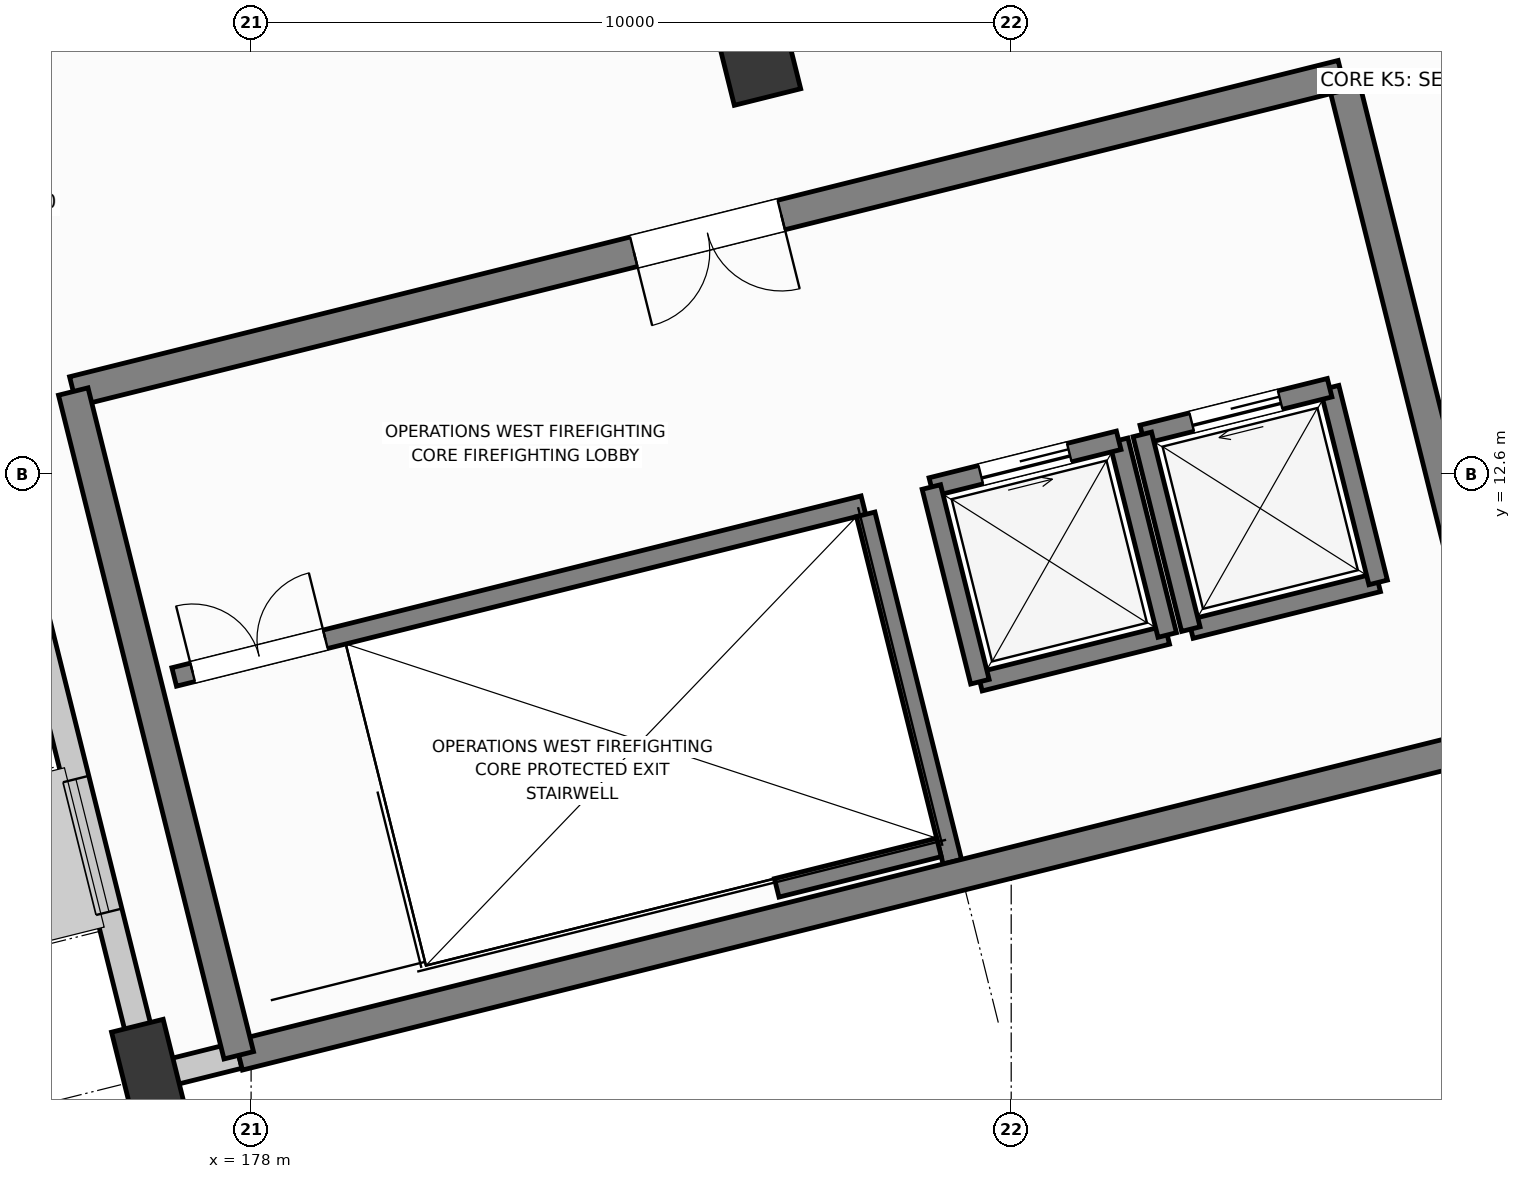
"""IFC4 building model, lengths in metres.
Left out: names, types, materials, properties, quantities, classifications, styles, units other than length and angle.
Written with IfcOpenShell. Run it as: python <this file> out.ifc"""

import sys

from ifc_helpers import new_model, si_unit, direction, frame, frame_2d, origin, origin_2d, place, context, subcontext, project, spatial, rectangle, extrude, element, fill, save


model = new_model("IFC4")
c1 = context("Model", 3, precision=1e-05, world=origin(), true_north=direction((0.0, 1.0)))
c2 = subcontext(c1, "Body", "Model", "MODEL_VIEW")
j1 = project(units=[si_unit("LENGTHUNIT", "METRE"), si_unit("PLANEANGLEUNIT", "RADIAN")], contexts=[c1])
p1 = place(None, origin())
s1 = spatial("IfcSite", under=j1, at=p1, CompositionType="ELEMENT")
p2 = place(p1, origin())
s2 = spatial("IfcBuilding", under=s1, at=p2, CompositionType="ELEMENT")
p3 = place(p2, frame((0.0, 0.0, 24.6)))
s3 = spatial("IfcBuildingStorey", under=s2, at=p3, CompositionType="ELEMENT", Elevation=24.6)
p4 = place(p3, frame((176.673, 4.661, 0.0), z_axis=(0.0, 0.0, 1.0), x_axis=(0.970295726276, 0.2419218956, 0.0)))
e1 = element("IfcColumn", 1, at=p4, inside=s3, PredefinedType="COLUMN", context=c2, shape_type="SweptSolid", body=[
    extrude(rectangle(XDim=0.7, YDim=1.4, at=origin_2d()), origin(), (0.0, 0.0, 1.0), 4.2),
])
p5 = place(p3, frame((184.685, 17.995, 0.0), z_axis=(0.0, 0.0, 1.0), x_axis=(0.970295726276, 0.2419218956, 0.0)))
e2 = element("IfcColumn", 2, at=p5, inside=s3, PredefinedType="COLUMN", context=c2, shape_type="SweptSolid", body=[
    extrude(rectangle(XDim=0.9, YDim=0.9, at=origin_2d()), origin(), (0.0, 0.0, 1.0), 4.2),
])
p6 = place(p3, frame((174.113, 14.931, 0.0), z_axis=(0.0, 0.0, 1.0), x_axis=(0.241921235018, -0.970295890977, 0.0)))
e3 = element("IfcWall", 3, at=p6, inside=s3, PredefinedType="STANDARD", context=c2, shape_type="SweptSolid", body=[
    extrude(rectangle(XDim=9.92, YDim=0.35, at=frame_2d((4.96, 0.0))), origin(), (0.0, 0.0, 1.0), 3.575),
])
p7 = place(p6, frame((1.58, 0.0, 0.85)))
e4 = element("IfcOpeningElement", 4, at=p7, cuts=e3, PredefinedType="OPENING", context=c2, shape_type="SweptSolid", body=[
    extrude(rectangle(XDim=1.8, YDim=1.65, at=frame_2d((0.9, 0.825))), frame((0.0, 0.185, 0.0), z_axis=(0.0, -1.0, 0.0), x_axis=(1.0, 0.0, 0.0)), (0.0, 0.0, 1.0), 0.37),
])
p8 = place(p6, frame((6.54, 0.0, 0.85)))
e5 = element("IfcOpeningElement", 5, at=p8, cuts=e3, PredefinedType="OPENING", context=c2, shape_type="SweptSolid", body=[
    extrude(rectangle(XDim=1.8, YDim=1.65, at=frame_2d((0.9, 0.825))), frame((0.0, 0.185, 0.0), z_axis=(0.0, -1.0, 0.0), x_axis=(1.0, 0.0, 0.0)), (0.0, 0.0, 1.0), 0.37),
])
p9 = place(p3, frame((176.673, 4.661, 0.0), z_axis=(0.0, 0.0, 1.0), x_axis=(0.970294277425, 0.24192770655, 0.0)))
e6 = element("IfcWall", 6, at=p9, inside=s3, PredefinedType="STANDARD", context=c2, shape_type="SweptSolid", body=[
    extrude(rectangle(XDim=1.2, YDim=0.35, at=frame_2d((0.6, 0.0))), origin(), (0.0, 0.0, 1.0), 4.2),
])
p10 = place(p3, frame((187.588, 9.866, 0.0), z_axis=(0.0, 0.0, 1.0), x_axis=(0.97029284861, 0.241933436994, 0.0)))
e7 = element("IfcWall", 7, at=p10, inside=s3, PredefinedType="SOLIDWALL", context=c2, shape_type="SweptSolid", body=[
    extrude(rectangle(XDim=2.54, YDim=0.25, at=frame_2d((1.27, 0.0))), origin(), (0.0, 0.0, 1.0), 3.98),
])
p11 = place(p3, frame((190.053, 10.481, 0.0), z_axis=(0.0, 0.0, 1.0), x_axis=(-0.241938414856, 0.970291607413, 0.0)))
e8 = element("IfcWall", 8, at=p11, inside=s3, PredefinedType="SOLIDWALL", context=c2, shape_type="SweptSolid", body=[
    extrude(rectangle(XDim=2.64, YDim=0.25, at=frame_2d((1.32, 0.0))), origin(), (0.0, 0.0, 1.0), 3.98),
])
p12 = place(p3, frame((189.414, 13.042, 0.0), z_axis=(0.0, 0.0, 1.0), x_axis=(-0.97029284861, -0.241933436994, 0.0)))
e9 = element("IfcWall", 9, at=p12, inside=s3, PredefinedType="SOLIDWALL", context=c2, shape_type="SweptSolid", body=[
    extrude(rectangle(XDim=2.54, YDim=0.25, at=frame_2d((1.27, 0.0))), origin(), (0.0, 0.0, 1.0), 3.98),
])
p13 = place(p12, frame((0.67, 0.0, 0.0)))
e10 = element("IfcOpeningElement", 10, at=p13, cuts=e9, PredefinedType="OPENING", context=c2, shape_type="SweptSolid", body=[
    extrude(rectangle(XDim=1.2, YDim=2.2, at=frame_2d((0.6, 1.1))), frame((0.0, 0.135, 0.0), z_axis=(0.0, -1.0, 0.0), x_axis=(1.0, 0.0, 0.0)), (0.0, 0.0, 1.0), 0.27),
])
p14 = place(p3, frame((186.95, 12.428, 0.0), z_axis=(0.0, 0.0, 1.0), x_axis=(0.241938414856, -0.970291607413, 0.0)))
e11 = element("IfcWall", 11, at=p14, inside=s3, PredefinedType="SOLIDWALL", context=c2, shape_type="SweptSolid", body=[
    extrude(rectangle(XDim=2.64, YDim=0.25, at=frame_2d((1.32, 0.0))), origin(), (0.0, 0.0, 1.0), 3.98),
])
p15 = place(p3, frame((190.363, 10.558, 0.0), z_axis=(0.0, 0.0, 1.0), x_axis=(0.97029284861, 0.241933436994, 0.0)))
e12 = element("IfcWall", 12, at=p15, inside=s3, PredefinedType="SOLIDWALL", context=c2, shape_type="SweptSolid", body=[
    extrude(rectangle(XDim=2.54, YDim=0.25, at=frame_2d((1.27, 0.0))), origin(), (0.0, 0.0, 1.0), 3.98),
])
p16 = place(p3, frame((192.828, 11.173, 0.0), z_axis=(0.0, 0.0, 1.0), x_axis=(-0.241938414856, 0.970291607413, 0.0)))
e13 = element("IfcWall", 13, at=p16, inside=s3, PredefinedType="SOLIDWALL", context=c2, shape_type="SweptSolid", body=[
    extrude(rectangle(XDim=2.64, YDim=0.25, at=frame_2d((1.32, 0.0))), origin(), (0.0, 0.0, 1.0), 3.98),
])
p17 = place(p3, frame((192.189, 13.734, 0.0), z_axis=(0.0, 0.0, 1.0), x_axis=(-0.97029284861, -0.241933436994, 0.0)))
e14 = element("IfcWall", 14, at=p17, inside=s3, PredefinedType="SOLIDWALL", context=c2, shape_type="SweptSolid", body=[
    extrude(rectangle(XDim=2.54, YDim=0.25, at=frame_2d((1.27, 0.0))), origin(), (0.0, 0.0, 1.0), 3.98),
])
p18 = place(p17, frame((0.67, 0.0, 0.0)))
e15 = element("IfcOpeningElement", 15, at=p18, cuts=e14, PredefinedType="OPENING", context=c2, shape_type="SweptSolid", body=[
    extrude(rectangle(XDim=1.2, YDim=2.2, at=frame_2d((0.6, 1.1))), frame((0.0, 0.135, 0.0), z_axis=(0.0, -1.0, 0.0), x_axis=(1.0, 0.0, 0.0)), (0.0, 0.0, 1.0), 0.27),
])
p19 = place(p3, frame((189.725, 13.12, 0.0), z_axis=(0.0, 0.0, 1.0), x_axis=(0.241938414856, -0.970291607413, 0.0)))
e16 = element("IfcWall", 16, at=p19, inside=s3, PredefinedType="SOLIDWALL", context=c2, shape_type="SweptSolid", body=[
    extrude(rectangle(XDim=2.64, YDim=0.25, at=frame_2d((1.32, 0.0))), origin(), (0.0, 0.0, 1.0), 3.98),
])
p20 = place(p3, frame((176.988, 9.929, 0.0), z_axis=(0.0, 0.0, 1.0), x_axis=(0.970297151331, 0.241916179943, 0.0)))
e17 = element("IfcWall", 17, at=p20, inside=s3, PredefinedType="SOLIDWALL", context=c2, shape_type="SweptSolid", body=[
    extrude(rectangle(XDim=9.345, YDim=0.25, at=frame_2d((4.673, 0.0))), origin(), (0.0, 0.0, 1.0), 3.98),
])
p21 = place(p20, frame((0.25, 0.0, 0.0)))
e18 = element("IfcOpeningElement", 18, at=p21, cuts=e17, PredefinedType="OPENING", context=c2, shape_type="SweptSolid", body=[
    extrude(rectangle(XDim=1.8, YDim=2.25, at=frame_2d((0.9, 1.125))), frame((0.0, 0.135, 0.0), z_axis=(0.0, -1.0, 0.0), x_axis=(1.0, 0.0, 0.0)), (0.0, 0.0, 1.0), 0.27),
])
p22 = place(p3, frame((187.225, 7.498, 0.0), z_axis=(0.0, 0.0, 1.0), x_axis=(-0.241911120435, 0.970298412763, 0.0)))
e19 = element("IfcWall", 19, at=p22, inside=s3, PredefinedType="SOLIDWALL", context=c2, shape_type="SweptSolid", body=[
    extrude(rectangle(XDim=4.71, YDim=0.25, at=frame_2d((2.355, 0.0))), origin(), (0.0, 0.0, 1.0), 3.98),
])
p23 = place(p3, frame((184.915, 7.154, 0.0), z_axis=(0.0, 0.0, 1.0), x_axis=(0.97029738597, 0.241915238833, 0.0)))
e20 = element("IfcWall", 20, at=p23, inside=s3, PredefinedType="SOLIDWALL", context=c2, shape_type="SweptSolid", body=[
    extrude(rectangle(XDim=2.2, YDim=0.25, at=frame_2d((1.1, 0.0))), origin(), (0.0, 0.0, 1.0), 3.98),
])
p24 = place(p3, frame((177.838, 4.951, 0.0), z_axis=(0.0, 0.0, 1.0), x_axis=(0.970295179998, 0.241924086589, 0.0)))
e21 = element("IfcWall", 21, at=p24, inside=s3, PredefinedType="SHEAR", context=c2, shape_type="SweptSolid", body=[
    extrude(rectangle(XDim=17.2, YDim=0.4, at=frame_2d((8.6, 0.0))), origin(), (0.0, 0.0, 1.0), 3.98),
])
p25 = place(p3, frame((194.527, 9.113, 0.0), z_axis=(0.0, 0.0, 1.0), x_axis=(-0.241923808098, 0.970295249435, 0.0)))
e22 = element("IfcWall", 22, at=p25, inside=s3, PredefinedType="SHEAR", context=c2, shape_type="SweptSolid", body=[
    extrude(rectangle(XDim=9.0, YDim=0.4, at=frame_2d((4.5, 0.0))), origin(), (0.0, 0.0, 1.0), 3.98),
])
p26 = place(p3, frame((192.349, 17.845, 0.0), z_axis=(0.0, 0.0, 1.0), x_axis=(-0.970296544738, -0.241918612906, 0.0)))
e23 = element("IfcWall", 23, at=p26, inside=s3, PredefinedType="SHEAR", context=c2, shape_type="SweptSolid", body=[
    extrude(rectangle(XDim=17.2, YDim=0.4, at=frame_2d((8.6, 0.0))), origin(), (0.0, 0.0, 1.0), 3.98),
])
p27 = place(p26, frame((7.6, 0.0, 0.0)))
e24 = element("IfcOpeningElement", 24, at=p27, cuts=e23, PredefinedType="OPENING", context=c2, shape_type="SweptSolid", body=[
    extrude(rectangle(XDim=2.0, YDim=2.3, at=frame_2d((1.0, 1.15))), frame((0.0, 0.21, 0.0), z_axis=(0.0, -1.0, 0.0), x_axis=(1.0, 0.0, 0.0)), (0.0, 0.0, 1.0), 0.42),
])
p28 = place(p3, frame((175.66, 13.684, 0.0), z_axis=(0.0, 0.0, 1.0), x_axis=(0.241921199913, -0.97029589973, 0.0)))
e25 = element("IfcWall", 25, at=p28, inside=s3, PredefinedType="SHEAR", context=c2, shape_type="SweptSolid", body=[
    extrude(rectangle(XDim=9.0, YDim=0.4, at=frame_2d((4.5, 0.0))), origin(), (0.0, 0.0, 1.0), 3.98),
])
p29 = place(p8, origin())
e26 = element("IfcWindow", 26, at=p29, inside=s3, PartitioningType="SINGLE_PANEL", PredefinedType="WINDOW", context=c2, shape_type="SweptSolid", body=[
    extrude(rectangle(XDim=1.8, YDim=1.65, at=frame_2d((0.9, 0.825))), frame((0.0, 0.03, 0.0), z_axis=(0.0, -1.0, 0.0), x_axis=(1.0, 0.0, 0.0)), (0.0, 0.0, 1.0), 0.06),
])
fill(e5, e26)
p30 = place(p13, origin())
e27 = element("IfcDoor", 27, at=p30, inside=s3, OperationType="SLIDING_TO_LEFT", PredefinedType="DOOR", context=c2, shape_type="SweptSolid", body=[
    extrude(rectangle(XDim=1.2, YDim=2.2, at=frame_2d((0.6, 1.1))), frame((0.0, 0.025, 0.0), z_axis=(0.0, -1.0, 0.0), x_axis=(1.0, 0.0, 0.0)), (0.0, 0.0, 1.0), 0.05),
])
fill(e10, e27)
p31 = place(p18, origin())
e28 = element("IfcDoor", 28, at=p31, inside=s3, OperationType="SLIDING_TO_RIGHT", PredefinedType="DOOR", context=c2, shape_type="SweptSolid", body=[
    extrude(rectangle(XDim=1.2, YDim=2.2, at=frame_2d((0.6, 1.1))), frame((0.0, 0.025, 0.0), z_axis=(0.0, -1.0, 0.0), x_axis=(1.0, 0.0, 0.0)), (0.0, 0.0, 1.0), 0.05),
])
fill(e15, e28)
p32 = place(p21, origin())
e29 = element("IfcDoor", 29, at=p32, inside=s3, OperationType="DOUBLE_DOOR_SINGLE_SWING", PredefinedType="DOOR", context=c2, shape_type="SweptSolid", body=[
    extrude(rectangle(XDim=1.8, YDim=2.25, at=frame_2d((0.9, 1.125))), frame((0.0, 0.025, 0.0), z_axis=(0.0, -1.0, 0.0), x_axis=(1.0, 0.0, 0.0)), (0.0, 0.0, 1.0), 0.05),
])
fill(e18, e29)
p33 = place(p27, origin())
e30 = element("IfcDoor", 30, at=p33, inside=s3, OperationType="DOUBLE_DOOR_SINGLE_SWING", PredefinedType="DOOR", context=c2, shape_type="SweptSolid", body=[
    extrude(rectangle(XDim=2.0, YDim=2.3, at=frame_2d((1.0, 1.15))), frame((0.0, 0.025, 0.0), z_axis=(0.0, -1.0, 0.0), x_axis=(1.0, 0.0, 0.0)), (0.0, 0.0, 1.0), 0.05),
])
fill(e24, e30)
save(model, sys.argv[1])
